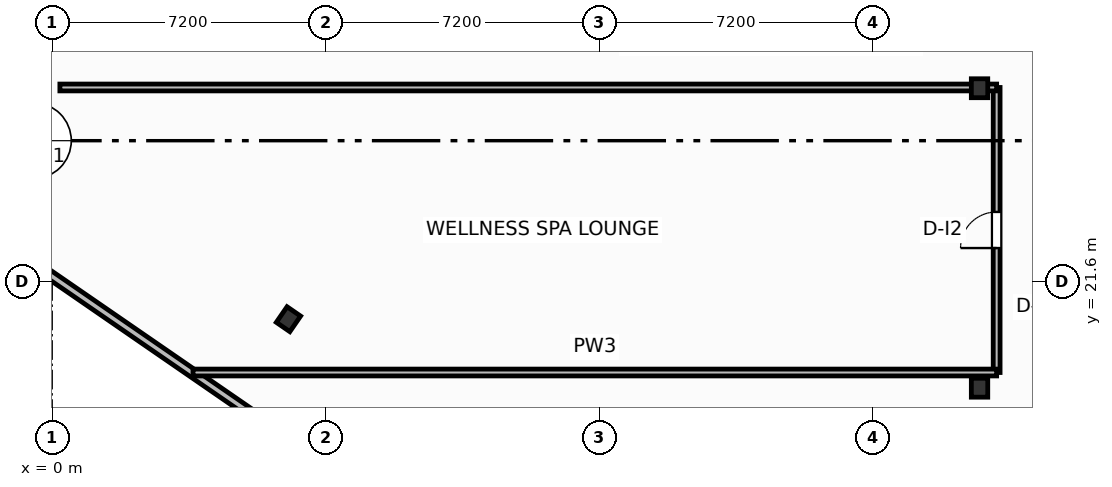
"""IFC4 building model, lengths in metres.
Left out: names, types, materials, properties, quantities, classifications, styles, units other than length and angle.
Written with IfcOpenShell. Run it as: python <this file> out.ifc"""

import sys

from ifc_helpers import new_model, si_unit, direction, frame, frame_2d, origin, origin_2d, place, context, subcontext, project, spatial, rectangle, i_section, extrude, element, fill, save


model = new_model("IFC4")
c1 = context("Model", 3, precision=1e-05, world=origin(), true_north=direction((0.0, 1.0)))
c2 = subcontext(c1, "Body", "Model", "MODEL_VIEW")
j1 = project(units=[si_unit("LENGTHUNIT", "METRE"), si_unit("PLANEANGLEUNIT", "RADIAN")], contexts=[c1])
p1 = place(None, origin())
s1 = spatial("IfcSite", under=j1, at=p1, CompositionType="ELEMENT")
p2 = place(p1, origin())
s2 = spatial("IfcBuilding", under=s1, at=p2, CompositionType="ELEMENT")
p3 = place(p2, frame((0.0, 0.0, 34.4)))
s3 = spatial("IfcBuildingStorey", under=s2, at=p3, CompositionType="ELEMENT", Elevation=34.4)
for number, where, z_axis, x_axis in (
    (1, (24.4, 18.8, 0.0), (0.0, 0.0, 1.0), (1.0, 0.0, 0.0)),
    (2, (24.4, 26.68, 0.0), (0.0, 0.0, 1.0), (1.0, 0.0, 0.0)),
    (3, (6.215, 20.603, 0.0), (0.0, 0.0, 1.0), (0.824, -0.567, 0.0)),
):
    element("IfcColumn", number, at=place(p3, frame(where, z_axis=z_axis, x_axis=x_axis)), inside=s3, PredefinedType="COLUMN", context=c2, shape_type="SweptSolid", body=[
        extrude(i_section(OverallWidth=0.432, OverallDepth=0.498, WebThickness=0.056, FlangeThickness=0.089, FilletRadius=0.025, at=origin_2d()), origin(), (0.0, 0.0, 1.0), 3.7),
    ])
p4 = place(p3, frame((-2.728, 23.605, 0.0), z_axis=(0.0, 0.0, 1.0), x_axis=(0.823535075462, -0.567265351915, 0.0)))
e4 = element("IfcWall", 4, at=p4, inside=s3, PredefinedType="SOLIDWALL", context=c2, shape_type="SweptSolid", body=[
    extrude(rectangle(XDim=23.247, YDim=0.22, at=frame_2d((11.624, 0.0))), origin(), (0.0, 0.0, 1.0), 2.73),
])
p5 = place(p4, frame((10.799, 0.0, 0.8)))
e5 = element("IfcOpeningElement", 5, at=p5, cuts=e4, PredefinedType="OPENING", context=c2, shape_type="SweptSolid", body=[
    extrude(rectangle(XDim=1.65, YDim=1.65, at=frame_2d((0.825, 0.825))), frame((0.0, 0.12, 0.0), z_axis=(0.0, -1.0, 0.0), x_axis=(1.0, 0.0, 0.0)), (0.0, 0.0, 1.0), 0.24),
])
p6 = place(p3, frame((24.85, 19.2, 0.0), z_axis=(0.0, 0.0, 1.0), x_axis=(0.0, 1.0, 0.0)))
e6 = element("IfcWall", 6, at=p6, inside=s3, PredefinedType="PARTITIONING", context=c2, shape_type="SweptSolid", body=[
    extrude(rectangle(XDim=7.5, YDim=0.18, at=frame_2d((3.75, 0.0))), origin(), (0.0, 0.0, 1.0), 3.45),
])
p7 = place(p6, frame((3.275, 0.0, 0.0)))
e7 = element("IfcOpeningElement", 7, at=p7, cuts=e6, PredefinedType="OPENING", context=c2, shape_type="SweptSolid", body=[
    extrude(rectangle(XDim=0.95, YDim=2.05, at=frame_2d((0.475, 1.025))), frame((0.0, 0.1, 0.0), z_axis=(0.0, -1.0, 0.0), x_axis=(1.0, 0.0, 0.0)), (0.0, 0.0, 1.0), 0.2),
])
p8 = place(p3, frame((3.703, 19.2, 0.0), z_axis=(0.0, 0.0, 1.0), x_axis=(1.0, 0.0, 0.0)))
e8 = element("IfcWall", 8, at=p8, inside=s3, PredefinedType="PARTITIONING", context=c2, shape_type="SweptSolid", body=[
    extrude(rectangle(XDim=21.147, YDim=0.18, at=frame_2d((10.574, 0.0))), origin(), (0.0, 0.0, 1.0), 2.58),
])
p9 = place(p3, frame((0.2, 26.7, 0.0), z_axis=(0.0, 0.0, 1.0), x_axis=(1.0, 0.0, 0.0)))
e9 = element("IfcWall", 9, at=p9, inside=s3, PredefinedType="PARTITIONING", context=c2, shape_type="SweptSolid", body=[
    extrude(rectangle(XDim=24.65, YDim=0.18, at=frame_2d((12.325, 0.0))), origin(), (0.0, 0.0, 1.0), 2.662),
])
p10 = place(p7, origin())
e10 = element("IfcDoor", 10, at=p10, inside=s3, OperationType="SINGLE_SWING_LEFT", PredefinedType="DOOR", context=c2, shape_type="SweptSolid", body=[
    extrude(rectangle(XDim=0.95, YDim=2.05, at=frame_2d((0.475, 1.025))), frame((0.0, 0.025, 0.0), z_axis=(0.0, -1.0, 0.0), x_axis=(1.0, 0.0, 0.0)), (0.0, 0.0, 1.0), 0.05),
])
fill(e7, e10)
save(model, sys.argv[1])
